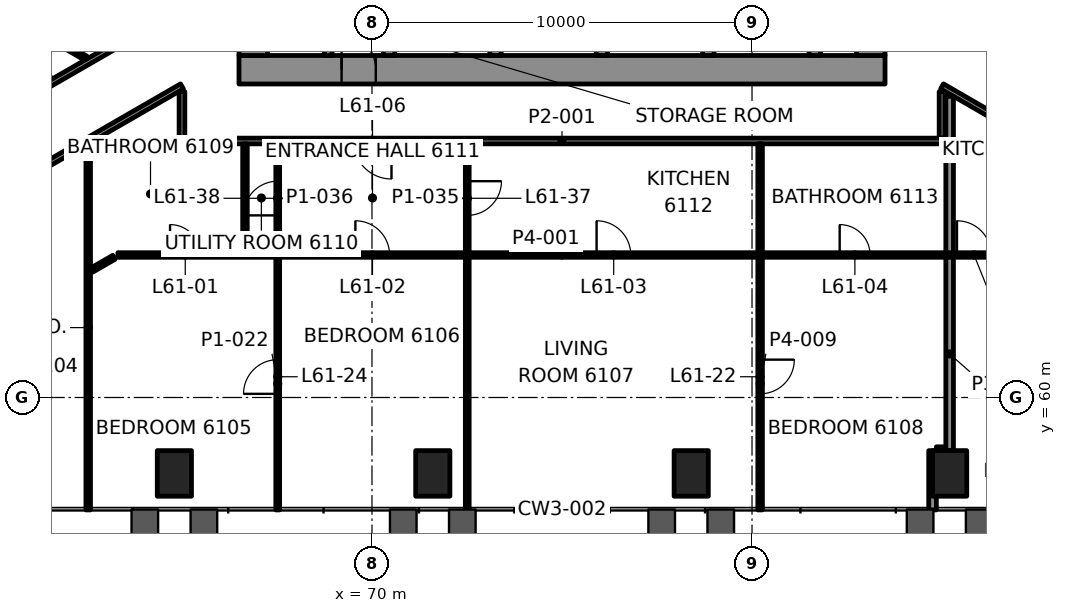
"""IFC4 building model, lengths in metres.
Left out: names, types, materials, properties, quantities, classifications, styles, units other than length and angle.
Written with IfcOpenShell. Run it as: python <this file> out.ifc"""

import sys

from ifc_helpers import new_model, si_unit, direction, frame, frame_2d, origin, origin_2d, place, context, subcontext, project, spatial, rectangle, hollow_rectangle, extrude, element, fill, save


model = new_model("IFC4")
c1 = context("Model", 3, precision=1e-05, world=origin(), true_north=direction((0.0, 1.0)))
c2 = subcontext(c1, "Body", "Model", "MODEL_VIEW")
j1 = project(units=[si_unit("LENGTHUNIT", "METRE"), si_unit("PLANEANGLEUNIT", "RADIAN")], contexts=[c1])
p1 = place(None, origin())
s1 = spatial("IfcSite", under=j1, at=p1, CompositionType="ELEMENT")
p2 = place(p1, origin())
s2 = spatial("IfcBuilding", under=s1, at=p2, CompositionType="ELEMENT")
p3 = place(p2, frame((0.0, 0.0, 260.1)))
s3 = spatial("IfcBuildingStorey", under=s2, at=p3, CompositionType="ELEMENT", Elevation=260.1)
for number, where, z_axis, x_axis in (
    (1, (64.8, 58.002, -0.0), (0.0, 0.0, 1.0), (1.0, 0.0, 0.0)),
    (2, (71.6, 58.002, -0.0), (0.0, 0.0, 1.0), (1.0, 0.0, 0.0)),
    (3, (78.4, 58.002, -0.0), (0.0, 0.0, 1.0), (1.0, 0.0, 0.0)),
    (4, (85.2, 58.002, -0.0), (0.0, 0.0, 1.0), (1.0, 0.0, 0.0)),
):
    element("IfcColumn", number, at=place(p3, frame(where, z_axis=z_axis, x_axis=x_axis)), inside=s3, PredefinedType="COLUMN", context=c2, shape_type="SweptSolid", body=[
        extrude(hollow_rectangle(XDim=0.9, YDim=1.2, WallThickness=0.06, at=origin_2d()), origin(), (0.0, 0.0, 1.0), 3.5),
    ])
p4 = place(p3, frame((66.5, 68.625, 0.0), z_axis=(0.0, 0.0, 1.0), x_axis=(1.0, 0.0, 0.0)))
e5 = element("IfcWall", 5, at=p4, inside=s3, PredefinedType="SHEAR", context=c2, shape_type="SweptSolid", body=[
    extrude(rectangle(XDim=17.0, YDim=0.75, at=frame_2d((8.5, 0.0))), origin(), (0.0, 0.0, 1.0), 3.3),
])
p5 = place(p4, frame((2.7, 0.0, 0.0)))
e6 = element("IfcOpeningElement", 6, at=p5, cuts=e5, PredefinedType="OPENING", context=c2, shape_type="SweptSolid", body=[
    extrude(rectangle(XDim=0.9, YDim=2.1, at=frame_2d((0.45, 1.05))), frame((0.0, 0.385, 0.0), z_axis=(0.0, -1.0, 0.0), x_axis=(1.0, 0.0, 0.0)), (0.0, 0.0, 1.0), 0.77),
])
p6 = place(p3, frame((66.875, 69.0, 0.0), z_axis=(0.0, 0.0, 1.0), x_axis=(0.0, 1.0, 0.0)))
e7 = element("IfcWall", 7, at=p6, inside=s3, PredefinedType="SHEAR", context=c2, shape_type="SweptSolid", body=[
    extrude(rectangle(XDim=12.0, YDim=0.75, at=frame_2d((6.0, 0.0))), origin(), (0.0, 0.0, 1.0), 3.3),
])
p7 = place(p6, frame((3.7, 0.0, 0.0)))
e8 = element("IfcOpeningElement", 8, at=p7, cuts=e7, PredefinedType="OPENING", context=c2, shape_type="SweptSolid", body=[
    extrude(rectangle(XDim=1.2, YDim=2.1, at=frame_2d((0.6, 1.05))), frame((0.0, 0.385, 0.0), z_axis=(0.0, -1.0, 0.0), x_axis=(1.0, 0.0, 0.0)), (0.0, 0.0, 1.0), 0.77),
])
p8 = place(p6, frame((0.925, 0.0, 0.0)))
e9 = element("IfcOpeningElement", 9, at=p8, cuts=e7, PredefinedType="OPENING", context=c2, shape_type="SweptSolid", body=[
    extrude(rectangle(XDim=0.9, YDim=2.1, at=frame_2d((0.45, 1.05))), frame((0.0, 0.385, 0.0), z_axis=(0.0, -1.0, 0.0), x_axis=(1.0, 0.0, 0.0)), (0.0, 0.0, 1.0), 0.77),
])
p9 = place(p3, frame((83.125, 69.0, 0.0), z_axis=(0.0, 0.0, 1.0), x_axis=(0.0, 1.0, 0.0)))
e10 = element("IfcWall", 10, at=p9, inside=s3, PredefinedType="SHEAR", context=c2, shape_type="SweptSolid", body=[
    extrude(rectangle(XDim=12.0, YDim=0.75, at=frame_2d((6.0, 0.0))), origin(), (0.0, 0.0, 1.0), 3.3),
])
p10 = place(p9, frame((3.4, 0.0, 0.0)))
e11 = element("IfcOpeningElement", 11, at=p10, cuts=e10, PredefinedType="OPENING", context=c2, shape_type="SweptSolid", body=[
    extrude(rectangle(XDim=1.8, YDim=2.1, at=frame_2d((0.9, 1.05))), frame((0.0, 0.385, 0.0), z_axis=(0.0, -1.0, 0.0), x_axis=(1.0, 0.0, 0.0)), (0.0, 0.0, 1.0), 0.77),
])
for number, where, z_axis, x_axis in (
    (12, (70.45, 69.0, 0.0), (0.0, 0.0, 1.0), (0.0, 1.0, 0.0)),
    (13, (73.25, 69.0, 0.0), (0.0, 0.0, 1.0), (0.0, 1.0, 0.0)),
    (14, (76.05, 69.0, 0.0), (0.0, 0.0, 1.0), (0.0, 1.0, 0.0)),
    (15, (78.85, 69.0, 0.0), (0.0, 0.0, 1.0), (0.0, 1.0, 0.0)),
    (16, (81.65, 69.0, 0.0), (0.0, 0.0, 1.0), (0.0, 1.0, 0.0)),
):
    element("IfcWall", number, at=place(p3, frame(where, z_axis=z_axis, x_axis=x_axis)), inside=s3, PredefinedType="SHEAR", context=c2, shape_type="SweptSolid", body=[
        extrude(rectangle(XDim=2.6, YDim=0.3, at=frame_2d((1.3, 0.0))), origin(), (0.0, 0.0, 1.0), 3.3),
    ])
p11 = place(p3, frame((84.851, 58.602, 0.0), z_axis=(0.0, 0.0, 1.0), x_axis=(1.0, 0.0, 0.0)))
e17 = element("IfcWall", 17, at=p11, inside=s3, PredefinedType="PARTITIONING", context=c2, shape_type="SweptSolid", body=[
    extrude(rectangle(XDim=0.249, YDim=0.2, at=frame_2d((0.125, 0.0))), origin(), (0.0, 0.0, 1.0), 2.7),
])
p12 = place(p3, frame((63.314, 63.75, 0.0), z_axis=(0.0, 0.0, 1.0), x_axis=(1.0, 0.0, 0.0)))
e18 = element("IfcWall", 18, at=p12, inside=s3, PredefinedType="PARTITIONING", context=c2, shape_type="SweptSolid", body=[
    extrude(rectangle(XDim=23.371, YDim=0.12, at=frame_2d((11.686, 0.0))), origin(), (0.0, 0.0, 1.0), 2.7),
])
p13 = place(p12, frame((1.372, 0.0, 0.0)))
e19 = element("IfcOpeningElement", 19, at=p13, cuts=e18, PredefinedType="OPENING", context=c2, shape_type="SweptSolid", body=[
    extrude(rectangle(XDim=0.8, YDim=2.1, at=frame_2d((0.4, 1.05))), frame((0.0, 0.07, 0.0), z_axis=(0.0, -1.0, 0.0), x_axis=(1.0, 0.0, 0.0)), (0.0, 0.0, 1.0), 0.14),
])
p14 = place(p12, frame((6.249, 0.0, 0.0)))
e20 = element("IfcOpeningElement", 20, at=p14, cuts=e18, PredefinedType="OPENING", context=c2, shape_type="SweptSolid", body=[
    extrude(rectangle(XDim=0.9, YDim=2.1, at=frame_2d((0.45, 1.05))), frame((0.0, 0.07, 0.0), z_axis=(0.0, -1.0, 0.0), x_axis=(1.0, 0.0, 0.0)), (0.0, 0.0, 1.0), 0.14),
])
p15 = place(p12, frame((12.595, 0.0, 0.0)))
e21 = element("IfcOpeningElement", 21, at=p15, cuts=e18, PredefinedType="OPENING", context=c2, shape_type="SweptSolid", body=[
    extrude(rectangle(XDim=0.9, YDim=2.1, at=frame_2d((0.45, 1.05))), frame((0.0, 0.07, 0.0), z_axis=(0.0, -1.0, 0.0), x_axis=(1.0, 0.0, 0.0)), (0.0, 0.0, 1.0), 0.14),
])
p16 = place(p12, frame((18.992, 0.0, 0.0)))
e22 = element("IfcOpeningElement", 22, at=p16, cuts=e18, PredefinedType="OPENING", context=c2, shape_type="SweptSolid", body=[
    extrude(rectangle(XDim=0.8, YDim=2.1, at=frame_2d((0.4, 1.05))), frame((0.0, 0.07, 0.0), z_axis=(0.0, -1.0, 0.0), x_axis=(1.0, 0.0, 0.0)), (0.0, 0.0, 1.0), 0.14),
])
p17 = place(p12, frame((22.078, 0.0, 0.0)))
e23 = element("IfcOpeningElement", 23, at=p17, cuts=e18, PredefinedType="OPENING", context=c2, shape_type="SweptSolid", body=[
    extrude(rectangle(XDim=0.9, YDim=2.1, at=frame_2d((0.45, 1.05))), frame((0.0, 0.07, 0.0), z_axis=(0.0, -1.0, 0.0), x_axis=(1.0, 0.0, 0.0)), (0.0, 0.0, 1.0), 0.14),
])
p18 = place(p3, frame((85.0, 66.75, 0.0), z_axis=(0.0, 0.0, 1.0), x_axis=(-1.0, 0.0, 0.0)))
e24 = element("IfcWall", 24, at=p18, inside=s3, PredefinedType="PARTITIONING", context=c2, shape_type="SweptSolid", body=[
    extrude(rectangle(XDim=20.0, YDim=0.15, at=frame_2d((10.0, 0.0))), origin(), (0.0, 0.0, 1.0), 2.7),
])
p19 = place(p18, frame((14.487, 0.0, 0.0)))
e25 = element("IfcOpeningElement", 25, at=p19, cuts=e24, PredefinedType="OPENING", context=c2, shape_type="SweptSolid", body=[
    extrude(rectangle(XDim=1.0, YDim=2.1, at=frame_2d((0.5, 1.05))), frame((0.0, 0.085, 0.0), z_axis=(0.0, -1.0, 0.0), x_axis=(1.0, 0.0, 0.0)), (0.0, 0.0, 1.0), 0.17),
])
p20 = place(p3, frame((62.628, 63.354, 0.0), z_axis=(0.0, 0.0, 1.0), x_axis=(0.865955892764, 0.500120377296, 0.0)))
e26 = element("IfcWall", 26, at=p20, inside=s3, PredefinedType="PARTITIONING", context=c2, shape_type="SweptSolid", body=[
    extrude(rectangle(XDim=0.673, YDim=0.12, at=frame_2d((0.336, 0.0))), origin(), (0.0, 0.0, 1.0), 2.7),
])
p21 = place(p3, frame((65.0, 68.187, 0.0), z_axis=(0.0, 0.0, 1.0), x_axis=(-0.866027660432, -0.499996091351, 0.0)))
e27 = element("IfcWall", 27, at=p21, inside=s3, PredefinedType="PARTITIONING", context=c2, shape_type="SweptSolid", body=[
    extrude(rectangle(XDim=14.494, YDim=0.15, at=frame_2d((7.247, 0.0))), origin(), (0.0, 0.0, 1.0), 2.547),
])
p22 = place(p21, frame((6.324, 0.0, 0.0)))
e28 = element("IfcOpeningElement", 28, at=p22, cuts=e27, PredefinedType="OPENING", context=c2, shape_type="SweptSolid", body=[
    extrude(rectangle(XDim=0.9, YDim=2.1, at=frame_2d((0.45, 1.05))), frame((0.0, 0.085, 0.0), z_axis=(0.0, -1.0, 0.0), x_axis=(1.0, 0.0, 0.0)), (0.0, 0.0, 1.0), 0.17),
])
p23 = place(p21, frame((12.004, 0.0, 0.0)))
e29 = element("IfcOpeningElement", 29, at=p23, cuts=e27, PredefinedType="OPENING", context=c2, shape_type="SweptSolid", body=[
    extrude(rectangle(XDim=0.9, YDim=2.1, at=frame_2d((0.45, 1.05))), frame((0.0, 0.085, 0.0), z_axis=(0.0, -1.0, 0.0), x_axis=(1.0, 0.0, 0.0)), (0.0, 0.0, 1.0), 0.17),
])
p24 = place(p3, frame((51.549, 62.5, 0.0), z_axis=(0.0, 0.0, 1.0), x_axis=(0.866020420161, 0.50000863179, 0.0)))
e30 = element("IfcWall", 30, at=p24, inside=s3, PredefinedType="PARTITIONING", context=c2, shape_type="SweptSolid", body=[
    extrude(rectangle(XDim=15.532, YDim=0.15, at=frame_2d((7.766, 0.0))), origin(), (0.0, 0.0, 1.0), 2.7),
])
p25 = place(p24, frame((5.474, 0.0, 0.0)))
e31 = element("IfcOpeningElement", 31, at=p25, cuts=e30, PredefinedType="OPENING", context=c2, shape_type="SweptSolid", body=[
    extrude(rectangle(XDim=0.9, YDim=2.1, at=frame_2d((0.45, 1.05))), frame((0.0, 0.085, 0.0), z_axis=(0.0, -1.0, 0.0), x_axis=(1.0, 0.0, 0.0)), (0.0, 0.0, 1.0), 0.17),
])
p26 = place(p3, frame((85.2, 58.603, 0.0), z_axis=(0.0, 0.0, 1.0), x_axis=(0.0, 1.0, 0.0)))
e32 = element("IfcWall", 32, at=p26, inside=s3, PredefinedType="PARTITIONING", context=c2, shape_type="SweptSolid", body=[
    extrude(rectangle(XDim=5.087, YDim=0.2, at=frame_2d((2.544, 0.0))), origin(), (0.0, 0.0, 1.0), 2.7),
])
p27 = place(p3, frame((85.0, 66.825, 0.0), z_axis=(0.0, 0.0, 1.0), x_axis=(0.0, 1.0, 0.0)))
e33 = element("IfcWall", 33, at=p27, inside=s3, PredefinedType="PARTITIONING", context=c2, shape_type="SweptSolid", body=[
    extrude(rectangle(XDim=1.226, YDim=0.15, at=frame_2d((0.613, 0.0))), origin(), (0.0, 0.0, 1.0), 2.547),
])
p28 = place(p3, frame((84.75, 57.042, 0.0), z_axis=(0.0, 0.0, 1.0), x_axis=(0.0, 1.0, 0.0)))
e34 = element("IfcWall", 34, at=p28, inside=s3, PredefinedType="PARTITIONING", context=c2, shape_type="SweptSolid", body=[
    extrude(rectangle(XDim=1.559, YDim=0.2, at=frame_2d((0.78, 0.0))), origin(), (0.0, 0.0, 1.0), 2.688),
])
p29 = place(p3, frame((80.213, 63.69, 0.0), z_axis=(0.0, 0.0, 1.0), x_axis=(0.0, -1.0, 0.0)))
e35 = element("IfcWall", 35, at=p29, inside=s3, PredefinedType="PARTITIONING", context=c2, shape_type="SweptSolid", body=[
    extrude(rectangle(XDim=6.648, YDim=0.12, at=frame_2d((3.324, 0.0))), origin(), (0.0, 0.0, 1.0), 2.688),
])
p30 = place(p29, frame((2.694, 0.0, 0.0)))
e36 = element("IfcOpeningElement", 36, at=p30, cuts=e35, PredefinedType="OPENING", context=c2, shape_type="SweptSolid", body=[
    extrude(rectangle(XDim=0.9, YDim=2.1, at=frame_2d((0.45, 1.05))), frame((0.0, 0.07, 0.0), z_axis=(0.0, -1.0, 0.0), x_axis=(1.0, 0.0, 0.0)), (0.0, 0.0, 1.0), 0.14),
])
p31 = place(p3, frame((72.507, 57.042, 0.0), z_axis=(0.0, 0.0, 1.0), x_axis=(0.0, 1.0, 0.0)))
e37 = element("IfcWall", 37, at=p31, inside=s3, PredefinedType="PARTITIONING", context=c2, shape_type="SweptSolid", body=[
    extrude(rectangle(XDim=6.648, YDim=0.1, at=frame_2d((3.324, 0.0))), origin(), (0.0, 0.0, 1.0), 2.688),
])
p32 = place(p3, frame((67.52, 57.042, 0.0), z_axis=(0.0, 0.0, 1.0), x_axis=(0.0, 1.0, 0.0)))
e38 = element("IfcWall", 38, at=p32, inside=s3, PredefinedType="PARTITIONING", context=c2, shape_type="SweptSolid", body=[
    extrude(rectangle(XDim=6.648, YDim=0.1, at=frame_2d((3.324, 0.0))), origin(), (0.0, 0.0, 1.0), 2.688),
])
p33 = place(p32, frame((3.054, 0.0, 0.0)))
e39 = element("IfcOpeningElement", 39, at=p33, cuts=e38, PredefinedType="OPENING", context=c2, shape_type="SweptSolid", body=[
    extrude(rectangle(XDim=0.9, YDim=2.1, at=frame_2d((0.45, 1.05))), frame((0.0, 0.06, 0.0), z_axis=(0.0, -1.0, 0.0), x_axis=(1.0, 0.0, 0.0)), (0.0, 0.0, 1.0), 0.12),
])
p34 = place(p3, frame((66.658, 63.81, 0.0), z_axis=(0.0, 0.0, 1.0), x_axis=(0.0, 1.0, 0.0)))
e40 = element("IfcWall", 40, at=p34, inside=s3, PredefinedType="PARTITIONING", context=c2, shape_type="SweptSolid", body=[
    extrude(rectangle(XDim=2.865, YDim=0.12, at=frame_2d((1.433, 0.0))), origin(), (0.0, 0.0, 1.0), 2.7),
])
p35 = place(p3, frame((65.0, 66.825, 0.0), z_axis=(0.0, 0.0, 1.0), x_axis=(0.0, 1.0, 0.0)))
e41 = element("IfcWall", 41, at=p35, inside=s3, PredefinedType="PARTITIONING", context=c2, shape_type="SweptSolid", body=[
    extrude(rectangle(XDim=1.226, YDim=0.15, at=frame_2d((0.613, 0.0))), origin(), (0.0, 0.0, 1.0), 2.547),
])
p36 = place(p3, frame((62.533, 57.042, 0.0), z_axis=(0.0, 0.0, 1.0), x_axis=(0.0, 1.0, 0.0)))
e42 = element("IfcWall", 42, at=p36, inside=s3, PredefinedType="PARTITIONING", context=c2, shape_type="SweptSolid", body=[
    extrude(rectangle(XDim=9.594, YDim=0.12, at=frame_2d((4.797, 0.0))), origin(), (0.0, 0.0, 1.0), 2.547),
])
p37 = place(p3, frame((85.0, 70.266, 0.0), z_axis=(0.0, 0.0, 1.0), x_axis=(0.866021473228, -0.500006807861, 0.0)))
e43 = element("IfcWall", 43, at=p37, inside=s3, PredefinedType="PARTITIONING", context=c2, shape_type="SweptSolid", body=[
    extrude(rectangle(XDim=15.533, YDim=0.15, at=frame_2d((7.767, 0.0))), origin(), (0.0, 0.0, 1.0), 2.7),
])
p38 = place(p37, frame((9.029, 0.0, 0.0)))
e44 = element("IfcOpeningElement", 44, at=p38, cuts=e43, PredefinedType="OPENING", context=c2, shape_type="SweptSolid", body=[
    extrude(rectangle(XDim=1.0, YDim=2.1, at=frame_2d((0.5, 1.05))), frame((0.0, 0.085, 0.0), z_axis=(0.0, -1.0, 0.0), x_axis=(1.0, 0.0, 0.0)), (0.0, 0.0, 1.0), 0.17),
])
p39 = place(p3, frame((97.552, 60.94, 0.0), z_axis=(0.0, 0.0, 1.0), x_axis=(-0.866027660432, 0.499996091351, 0.0)))
e45 = element("IfcWall", 45, at=p39, inside=s3, PredefinedType="PARTITIONING", context=c2, shape_type="SweptSolid", body=[
    extrude(rectangle(XDim=14.494, YDim=0.15, at=frame_2d((7.247, 0.0))), origin(), (0.0, 0.0, 1.0), 2.547),
])
p40 = place(p39, frame((8.955, 0.0, 0.0)))
e46 = element("IfcOpeningElement", 46, at=p40, cuts=e45, PredefinedType="OPENING", context=c2, shape_type="SweptSolid", body=[
    extrude(rectangle(XDim=1.0, YDim=2.1, at=frame_2d((0.5, 1.05))), frame((0.0, 0.085, 0.0), z_axis=(0.0, -1.0, 0.0), x_axis=(1.0, 0.0, 0.0)), (0.0, 0.0, 1.0), 0.17),
])
p41 = place(p3, frame((62.469, 68.931, 0.0), z_axis=(0.0, 0.0, 1.0), x_axis=(-0.866033317326, 0.499986293093, 0.0)))
e47 = element("IfcWall", 47, at=p41, inside=s3, PredefinedType="PARTITIONING", context=c2, shape_type="SweptSolid", body=[
    extrude(rectangle(XDim=3.337, YDim=0.12, at=frame_2d((1.669, 0.0))), origin(), (0.0, 0.0, 1.0), 2.7),
])
p42 = place(p3, frame((85.2, 63.81, 0.0), z_axis=(0.0, 0.0, 1.0), x_axis=(0.0, 1.0, 0.0)))
e48 = element("IfcWall", 48, at=p42, inside=s3, PredefinedType="PARTITIONING", context=c2, shape_type="SweptSolid", body=[
    extrude(rectangle(XDim=4.115, YDim=0.2, at=frame_2d((2.058, 0.0))), origin(), (0.0, 0.0, 1.0), 2.547),
])
p43 = place(p3, frame((80.213, 63.81, 0.0), z_axis=(0.0, 0.0, 1.0), x_axis=(0.0, 1.0, 0.0)))
e49 = element("IfcWall", 49, at=p43, inside=s3, PredefinedType="PARTITIONING", context=c2, shape_type="SweptSolid", body=[
    extrude(rectangle(XDim=2.865, YDim=0.12, at=frame_2d((1.433, 0.0))), origin(), (0.0, 0.0, 1.0), 2.7),
])
p44 = place(p3, frame((72.507, 66.675, 0.0), z_axis=(0.0, 0.0, 1.0), x_axis=(0.0, -1.0, 0.0)))
e50 = element("IfcWall", 50, at=p44, inside=s3, PredefinedType="PARTITIONING", context=c2, shape_type="SweptSolid", body=[
    extrude(rectangle(XDim=2.865, YDim=0.1, at=frame_2d((1.433, 0.0))), origin(), (0.0, 0.0, 1.0), 2.7),
])
p45 = place(p44, frame((0.982, 0.0, 0.0)))
e51 = element("IfcOpeningElement", 51, at=p45, cuts=e50, PredefinedType="OPENING", context=c2, shape_type="SweptSolid", body=[
    extrude(rectangle(XDim=0.9, YDim=2.1, at=frame_2d((0.45, 1.05))), frame((0.0, 0.06, 0.0), z_axis=(0.0, -1.0, 0.0), x_axis=(1.0, 0.0, 0.0)), (0.0, 0.0, 1.0), 0.12),
])
p46 = place(p3, frame((67.52, 63.81, 0.0), z_axis=(0.0, 0.0, 1.0), x_axis=(0.0, 1.0, 0.0)))
e52 = element("IfcWall", 52, at=p46, inside=s3, PredefinedType="PARTITIONING", context=c2, shape_type="SweptSolid", body=[
    extrude(rectangle(XDim=2.865, YDim=0.1, at=frame_2d((1.433, 0.0))), origin(), (0.0, 0.0, 1.0), 2.7),
])
p47 = place(p46, frame((0.982, 0.0, 0.0)))
e53 = element("IfcOpeningElement", 53, at=p47, cuts=e52, PredefinedType="OPENING", context=c2, shape_type="SweptSolid", body=[
    extrude(rectangle(XDim=0.9, YDim=2.1, at=frame_2d((0.45, 1.05))), frame((0.0, 0.06, 0.0), z_axis=(0.0, -1.0, 0.0), x_axis=(1.0, 0.0, 0.0)), (0.0, 0.0, 1.0), 0.12),
])
p48 = place(p3, frame((68.85, 69.0, 0.0), z_axis=(0.0, 0.0, 1.0), x_axis=(0.0, 1.0, 0.0)))
e54 = element("IfcWall", 54, at=p48, inside=s3, PredefinedType="PARTITIONING", context=c2, shape_type="SweptSolid", body=[
    extrude(rectangle(XDim=2.65, YDim=0.2, at=frame_2d((1.325, 0.0))), origin(), (0.0, 0.0, 1.0), 3.3),
])
p49 = place(p13, origin())
e55 = element("IfcDoor", 55, at=p49, inside=s3, OperationType="SINGLE_SWING_RIGHT", PredefinedType="DOOR", context=c2, shape_type="SweptSolid", body=[
    extrude(rectangle(XDim=0.8, YDim=2.1, at=frame_2d((0.4, 1.05))), frame((0.0, 0.025, 0.0), z_axis=(0.0, -1.0, 0.0), x_axis=(1.0, 0.0, 0.0)), (0.0, 0.0, 1.0), 0.05),
])
fill(e19, e55)
p50 = place(p14, origin())
e56 = element("IfcDoor", 56, at=p50, inside=s3, OperationType="SINGLE_SWING_LEFT", PredefinedType="DOOR", context=c2, shape_type="SweptSolid", body=[
    extrude(rectangle(XDim=0.9, YDim=2.1, at=frame_2d((0.45, 1.05))), frame((0.0, 0.025, 0.0), z_axis=(0.0, -1.0, 0.0), x_axis=(1.0, 0.0, 0.0)), (0.0, 0.0, 1.0), 0.05),
])
fill(e20, e56)
p51 = place(p15, origin())
e57 = element("IfcDoor", 57, at=p51, inside=s3, OperationType="SINGLE_SWING_RIGHT", PredefinedType="DOOR", context=c2, shape_type="SweptSolid", body=[
    extrude(rectangle(XDim=0.9, YDim=2.1, at=frame_2d((0.45, 1.05))), frame((0.0, 0.025, 0.0), z_axis=(0.0, -1.0, 0.0), x_axis=(1.0, 0.0, 0.0)), (0.0, 0.0, 1.0), 0.05),
])
fill(e21, e57)
p52 = place(p16, origin())
e58 = element("IfcDoor", 58, at=p52, inside=s3, OperationType="SINGLE_SWING_LEFT", PredefinedType="DOOR", context=c2, shape_type="SweptSolid", body=[
    extrude(rectangle(XDim=0.8, YDim=2.1, at=frame_2d((0.4, 1.05))), frame((0.0, 0.025, 0.0), z_axis=(0.0, -1.0, 0.0), x_axis=(1.0, 0.0, 0.0)), (0.0, 0.0, 1.0), 0.05),
])
fill(e22, e58)
p53 = place(p17, origin())
e59 = element("IfcDoor", 59, at=p53, inside=s3, OperationType="SINGLE_SWING_RIGHT", PredefinedType="DOOR", context=c2, shape_type="SweptSolid", body=[
    extrude(rectangle(XDim=0.9, YDim=2.1, at=frame_2d((0.45, 1.05))), frame((0.0, 0.025, 0.0), z_axis=(0.0, -1.0, 0.0), x_axis=(1.0, 0.0, 0.0)), (0.0, 0.0, 1.0), 0.05),
])
fill(e23, e59)
p54 = place(p19, origin())
e60 = element("IfcDoor", 60, at=p54, inside=s3, OperationType="SINGLE_SWING_LEFT", PredefinedType="DOOR", context=c2, shape_type="SweptSolid", body=[
    extrude(rectangle(XDim=1.0, YDim=2.1, at=frame_2d((0.5, 1.05))), frame((0.0, 0.025, 0.0), z_axis=(0.0, -1.0, 0.0), x_axis=(1.0, 0.0, 0.0)), (0.0, 0.0, 1.0), 0.05),
])
fill(e25, e60)
p55 = place(p30, origin())
e61 = element("IfcDoor", 61, at=p55, inside=s3, OperationType="SINGLE_SWING_LEFT", PredefinedType="DOOR", context=c2, shape_type="SweptSolid", body=[
    extrude(rectangle(XDim=0.9, YDim=2.1, at=frame_2d((0.45, 1.05))), frame((0.0, 0.025, 0.0), z_axis=(0.0, -1.0, 0.0), x_axis=(1.0, 0.0, 0.0)), (0.0, 0.0, 1.0), 0.05),
])
fill(e36, e61)
p56 = place(p33, origin())
e62 = element("IfcDoor", 62, at=p56, inside=s3, OperationType="SINGLE_SWING_LEFT", PredefinedType="DOOR", context=c2, shape_type="SweptSolid", body=[
    extrude(rectangle(XDim=0.9, YDim=2.1, at=frame_2d((0.45, 1.05))), frame((0.0, 0.025, 0.0), z_axis=(0.0, -1.0, 0.0), x_axis=(1.0, 0.0, 0.0)), (0.0, 0.0, 1.0), 0.05),
])
fill(e39, e62)
p57 = place(p45, origin())
e63 = element("IfcDoor", 63, at=p57, inside=s3, OperationType="SINGLE_SWING_LEFT", PredefinedType="DOOR", context=c2, shape_type="SweptSolid", body=[
    extrude(rectangle(XDim=0.9, YDim=2.1, at=frame_2d((0.45, 1.05))), frame((0.0, 0.025, 0.0), z_axis=(0.0, -1.0, 0.0), x_axis=(1.0, 0.0, 0.0)), (0.0, 0.0, 1.0), 0.05),
])
fill(e51, e63)
p58 = place(p47, origin())
e64 = element("IfcDoor", 64, at=p58, inside=s3, OperationType="SINGLE_SWING_LEFT", PredefinedType="DOOR", context=c2, shape_type="SweptSolid", body=[
    extrude(rectangle(XDim=0.9, YDim=2.1, at=frame_2d((0.45, 1.05))), frame((0.0, 0.025, 0.0), z_axis=(0.0, -1.0, 0.0), x_axis=(1.0, 0.0, 0.0)), (0.0, 0.0, 1.0), 0.05),
])
fill(e53, e64)
p59 = place(p5, origin())
e65 = element("IfcDoor", 65, at=p59, inside=s3, OperationType="SINGLE_SWING_LEFT", PredefinedType="DOOR", context=c2, shape_type="SweptSolid", body=[
    extrude(rectangle(XDim=0.9, YDim=2.1, at=frame_2d((0.45, 1.05))), frame((0.0, 0.095, 0.0), z_axis=(0.0, -1.0, 0.0), x_axis=(1.0, 0.0, 0.0)), (0.0, 0.0, 1.0), 0.19),
])
fill(e6, e65)
save(model, sys.argv[1])
